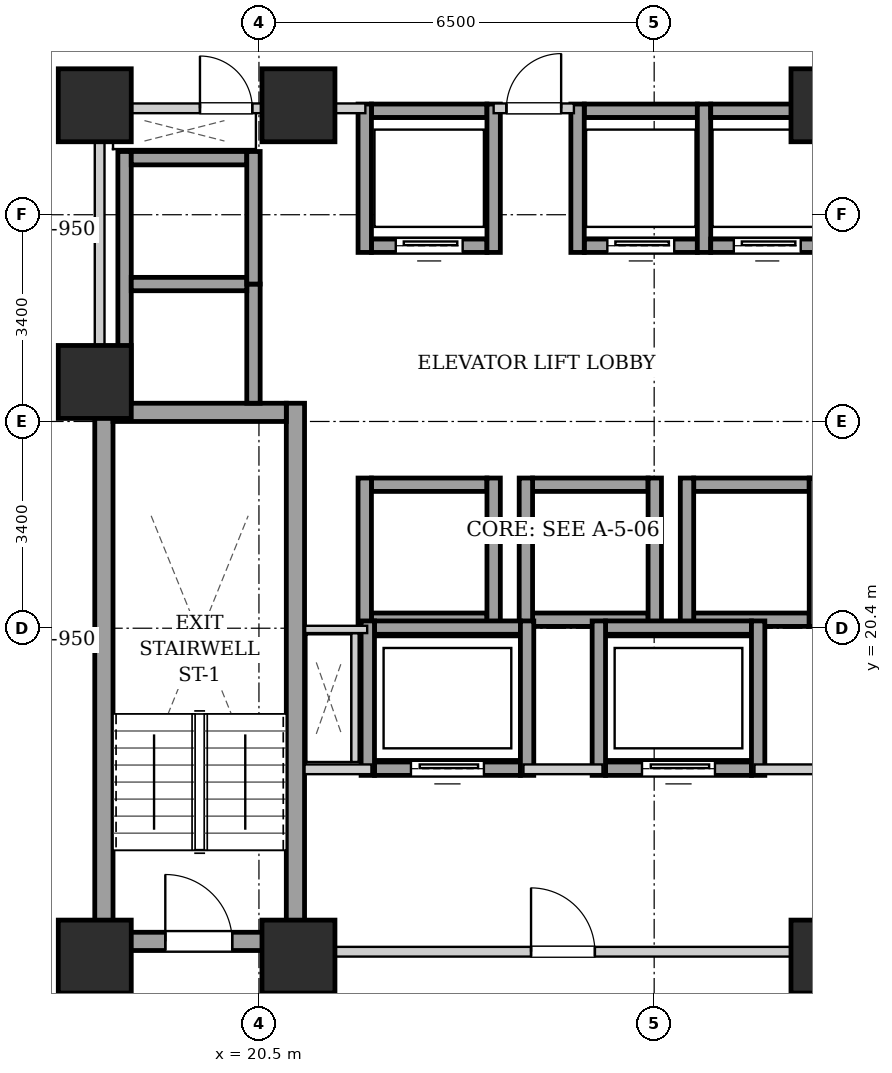
"""IFC4 building model, lengths in metres.
Left out: names, types, materials, properties, quantities, classifications, styles, units other than length and angle.
Written with IfcOpenShell. Run it as: python <this file> out.ifc"""

import sys

from ifc_helpers import new_model, si_unit, direction, frame, frame_2d, origin, origin_2d, place, context, subcontext, project, spatial, rectangle, extrude, element, fill, save


model = new_model("IFC4")
c1 = context("Model", 3, precision=1e-05, world=origin(), true_north=direction((0.0, 1.0)))
c2 = subcontext(c1, "Body", "Model", "MODEL_VIEW")
j1 = project(units=[si_unit("LENGTHUNIT", "METRE"), si_unit("PLANEANGLEUNIT", "RADIAN")], contexts=[c1])
p1 = place(None, origin())
s1 = spatial("IfcSite", under=j1, at=p1, CompositionType="ELEMENT")
p2 = place(p1, origin())
s2 = spatial("IfcBuilding", under=s1, at=p2, CompositionType="ELEMENT")
p3 = place(p2, frame((0.0, 0.0, 32.2)))
s3 = spatial("IfcBuildingStorey", under=s2, at=p3, CompositionType="ELEMENT", Elevation=32.2)
for number, where, z_axis, x_axis in (
    (1, (17.8, 15.0, 0.0), (0.0, 0.0, 1.0), (1.0, 0.0, 0.0)),
    (2, (21.15, 15.0, 0.0), (0.0, 0.0, 1.0), (1.0, 0.0, 0.0)),
    (3, (29.85, 15.0, 0.0), (0.0, 0.0, 1.0), (1.0, 0.0, 0.0)),
    (4, (17.8, 29.0, 0.0), (0.0, 0.0, 1.0), (1.0, 0.0, 0.0)),
    (5, (21.15, 29.0, 0.0), (0.0, 0.0, 1.0), (1.0, 0.0, 0.0)),
    (6, (29.85, 29.0, 0.0), (0.0, 0.0, 1.0), (1.0, 0.0, 0.0)),
    (7, (17.8, 24.45, 0.0), (0.0, 0.0, 1.0), (1.0, 0.0, 0.0)),
):
    element("IfcColumn", number, at=place(p3, frame(where, z_axis=z_axis, x_axis=x_axis)), inside=s3, PredefinedType="COLUMN", context=c2, shape_type="SweptSolid", body=[
        extrude(rectangle(XDim=1.2, YDim=1.2, at=origin_2d()), origin(), (0.0, 0.0, 1.0), 3.2),
    ])
for number, where, z_axis, x_axis in (
    (8, (17.95, 15.1, 0.0), (0.0, 0.0, 1.0), (0.0, 1.0, 0.0)),
    (9, (21.1, 15.1, 0.0), (0.0, 0.0, 1.0), (0.0, 1.0, 0.0)),
):
    element("IfcWall", number, at=place(p3, frame(where, z_axis=z_axis, x_axis=x_axis)), inside=s3, PredefinedType="SHEAR", context=c2, shape_type="SweptSolid", body=[
        extrude(rectangle(XDim=9.0, YDim=0.3, at=frame_2d((4.5, 0.0))), origin(), (0.0, 0.0, 1.0), 2.94),
    ])
p4 = place(p3, frame((18.1, 23.95, 0.0), z_axis=(0.0, 0.0, 1.0), x_axis=(1.0, 0.0, 0.0)))
e10 = element("IfcWall", 10, at=p4, inside=s3, PredefinedType="SHEAR", context=c2, shape_type="SweptSolid", body=[
    extrude(rectangle(XDim=2.85, YDim=0.3, at=frame_2d((1.425, 0.0))), origin(), (0.0, 0.0, 1.0), 2.94),
])
p5 = place(p3, frame((18.1, 15.25, 0.0), z_axis=(0.0, 0.0, 1.0), x_axis=(1.0, 0.0, 0.0)))
e11 = element("IfcWall", 11, at=p5, inside=s3, PredefinedType="SHEAR", context=c2, shape_type="SweptSolid", body=[
    extrude(rectangle(XDim=2.85, YDim=0.3, at=frame_2d((1.425, 0.0))), origin(), (0.0, 0.0, 1.0), 2.94),
])
p6 = place(p5, frame((0.86, 0.0, 0.0)))
e12 = element("IfcOpeningElement", 12, at=p6, cuts=e11, PredefinedType="OPENING", context=c2, shape_type="SweptSolid", body=[
    extrude(rectangle(XDim=1.1, YDim=2.05, at=frame_2d((0.55, 1.025))), frame((0.0, 0.16, 0.0), z_axis=(0.0, -1.0, 0.0), x_axis=(1.0, 0.0, 0.0)), (0.0, 0.0, 1.0), 0.32),
])
p7 = place(p3, frame((22.35, 26.69, 0.0), z_axis=(0.0, 0.0, 1.0), x_axis=(1.0, 0.0, 0.0)))
e13 = element("IfcWall", 13, at=p7, inside=s3, PredefinedType="SHEAR", context=c2, shape_type="SweptSolid", body=[
    extrude(rectangle(XDim=1.9, YDim=0.22, at=frame_2d((0.95, 0.0))), origin(), (0.0, 0.0, 1.0), 2.94),
])
p8 = place(p7, frame((0.4, 0.0, 0.0)))
e14 = element("IfcOpeningElement", 14, at=p8, cuts=e13, PredefinedType="OPENING", context=c2, shape_type="SweptSolid", body=[
    extrude(rectangle(XDim=1.1, YDim=2.15, at=frame_2d((0.55, 1.075))), frame((0.0, 0.12, 0.0), z_axis=(0.0, -1.0, 0.0), x_axis=(1.0, 0.0, 0.0)), (0.0, 0.0, 1.0), 0.24),
])
p9 = place(p3, frame((22.35, 28.91, 0.0), z_axis=(0.0, 0.0, 1.0), x_axis=(1.0, 0.0, 0.0)))
e15 = element("IfcWall", 15, at=p9, inside=s3, PredefinedType="SHEAR", context=c2, shape_type="SweptSolid", body=[
    extrude(rectangle(XDim=1.9, YDim=0.22, at=frame_2d((0.95, 0.0))), origin(), (0.0, 0.0, 1.0), 2.94),
])
for number, where, z_axis, x_axis in (
    (16, (22.24, 26.58, 0.0), (0.0, 0.0, 1.0), (0.0, 1.0, 0.0)),
    (17, (24.36, 26.58, 0.0), (0.0, 0.0, 1.0), (0.0, 1.0, 0.0)),
):
    element("IfcWall", number, at=place(p3, frame(where, z_axis=z_axis, x_axis=x_axis)), inside=s3, PredefinedType="SHEAR", context=c2, shape_type="SweptSolid", body=[
        extrude(rectangle(XDim=2.44, YDim=0.22, at=frame_2d((1.22, 0.0))), origin(), (0.0, 0.0, 1.0), 2.94),
    ])
p10 = place(p3, frame((25.85, 26.69, 0.0), z_axis=(0.0, 0.0, 1.0), x_axis=(1.0, 0.0, 0.0)))
e18 = element("IfcWall", 18, at=p10, inside=s3, PredefinedType="SHEAR", context=c2, shape_type="SweptSolid", body=[
    extrude(rectangle(XDim=1.86, YDim=0.22, at=frame_2d((0.93, 0.0))), origin(), (0.0, 0.0, 1.0), 2.94),
])
p11 = place(p10, frame((0.38, 0.0, 0.0)))
e19 = element("IfcOpeningElement", 19, at=p11, cuts=e18, PredefinedType="OPENING", context=c2, shape_type="SweptSolid", body=[
    extrude(rectangle(XDim=1.1, YDim=2.15, at=frame_2d((0.55, 1.075))), frame((0.0, 0.12, 0.0), z_axis=(0.0, -1.0, 0.0), x_axis=(1.0, 0.0, 0.0)), (0.0, 0.0, 1.0), 0.24),
])
p12 = place(p3, frame((25.85, 28.91, 0.0), z_axis=(0.0, 0.0, 1.0), x_axis=(1.0, 0.0, 0.0)))
e20 = element("IfcWall", 20, at=p12, inside=s3, PredefinedType="SHEAR", context=c2, shape_type="SweptSolid", body=[
    extrude(rectangle(XDim=1.86, YDim=0.22, at=frame_2d((0.93, 0.0))), origin(), (0.0, 0.0, 1.0), 2.94),
])
for number, where, z_axis, x_axis in (
    (21, (25.74, 26.58, 0.0), (0.0, 0.0, 1.0), (0.0, 1.0, 0.0)),
    (22, (27.82, 26.58, 0.0), (0.0, 0.0, 1.0), (0.0, 1.0, 0.0)),
):
    element("IfcWall", number, at=place(p3, frame(where, z_axis=z_axis, x_axis=x_axis)), inside=s3, PredefinedType="SHEAR", context=c2, shape_type="SweptSolid", body=[
        extrude(rectangle(XDim=2.44, YDim=0.22, at=frame_2d((1.22, 0.0))), origin(), (0.0, 0.0, 1.0), 2.94),
    ])
p13 = place(p3, frame((27.93, 26.69, 0.0), z_axis=(0.0, 0.0, 1.0), x_axis=(1.0, 0.0, 0.0)))
e23 = element("IfcWall", 23, at=p13, inside=s3, PredefinedType="SHEAR", context=c2, shape_type="SweptSolid", body=[
    extrude(rectangle(XDim=1.86, YDim=0.22, at=frame_2d((0.93, 0.0))), origin(), (0.0, 0.0, 1.0), 2.94),
])
p14 = place(p13, frame((0.38, 0.0, 0.0)))
e24 = element("IfcOpeningElement", 24, at=p14, cuts=e23, PredefinedType="OPENING", context=c2, shape_type="SweptSolid", body=[
    extrude(rectangle(XDim=1.1, YDim=2.15, at=frame_2d((0.55, 1.075))), frame((0.0, 0.12, 0.0), z_axis=(0.0, -1.0, 0.0), x_axis=(1.0, 0.0, 0.0)), (0.0, 0.0, 1.0), 0.24),
])
p15 = place(p3, frame((27.93, 28.91, 0.0), z_axis=(0.0, 0.0, 1.0), x_axis=(1.0, 0.0, 0.0)))
e25 = element("IfcWall", 25, at=p15, inside=s3, PredefinedType="SHEAR", context=c2, shape_type="SweptSolid", body=[
    extrude(rectangle(XDim=1.86, YDim=0.22, at=frame_2d((0.93, 0.0))), origin(), (0.0, 0.0, 1.0), 2.94),
])
for number, where, z_axis, x_axis in (
    (26, (22.35, 20.54, 0.0), (0.0, 0.0, 1.0), (1.0, 0.0, 0.0)),
    (27, (22.35, 22.76, 0.0), (0.0, 0.0, 1.0), (1.0, 0.0, 0.0)),
):
    element("IfcWall", number, at=place(p3, frame(where, z_axis=z_axis, x_axis=x_axis)), inside=s3, PredefinedType="SHEAR", context=c2, shape_type="SweptSolid", body=[
        extrude(rectangle(XDim=1.9, YDim=0.22, at=frame_2d((0.95, 0.0))), origin(), (0.0, 0.0, 1.0), 2.94),
    ])
for number, where, z_axis, x_axis in (
    (28, (22.24, 20.43, 0.0), (0.0, 0.0, 1.0), (0.0, 1.0, 0.0)),
    (29, (24.36, 20.43, 0.0), (0.0, 0.0, 1.0), (0.0, 1.0, 0.0)),
):
    element("IfcWall", number, at=place(p3, frame(where, z_axis=z_axis, x_axis=x_axis)), inside=s3, PredefinedType="SHEAR", context=c2, shape_type="SweptSolid", body=[
        extrude(rectangle(XDim=2.44, YDim=0.22, at=frame_2d((1.22, 0.0))), origin(), (0.0, 0.0, 1.0), 2.94),
    ])
for number, where, z_axis, x_axis in (
    (30, (25.0, 20.54, 0.0), (0.0, 0.0, 1.0), (1.0, 0.0, 0.0)),
    (31, (25.0, 22.76, 0.0), (0.0, 0.0, 1.0), (1.0, 0.0, 0.0)),
):
    element("IfcWall", number, at=place(p3, frame(where, z_axis=z_axis, x_axis=x_axis)), inside=s3, PredefinedType="SHEAR", context=c2, shape_type="SweptSolid", body=[
        extrude(rectangle(XDim=1.9, YDim=0.22, at=frame_2d((0.95, 0.0))), origin(), (0.0, 0.0, 1.0), 2.94),
    ])
for number, where, z_axis, x_axis in (
    (32, (24.89, 20.43, 0.0), (0.0, 0.0, 1.0), (0.0, 1.0, 0.0)),
    (33, (27.01, 20.43, 0.0), (0.0, 0.0, 1.0), (0.0, 1.0, 0.0)),
):
    element("IfcWall", number, at=place(p3, frame(where, z_axis=z_axis, x_axis=x_axis)), inside=s3, PredefinedType="SHEAR", context=c2, shape_type="SweptSolid", body=[
        extrude(rectangle(XDim=2.44, YDim=0.22, at=frame_2d((1.22, 0.0))), origin(), (0.0, 0.0, 1.0), 2.94),
    ])
for number, where, z_axis, x_axis in (
    (34, (27.65, 20.54, 0.0), (0.0, 0.0, 1.0), (1.0, 0.0, 0.0)),
    (35, (27.65, 22.76, 0.0), (0.0, 0.0, 1.0), (1.0, 0.0, 0.0)),
):
    element("IfcWall", number, at=place(p3, frame(where, z_axis=z_axis, x_axis=x_axis)), inside=s3, PredefinedType="SHEAR", context=c2, shape_type="SweptSolid", body=[
        extrude(rectangle(XDim=1.9, YDim=0.22, at=frame_2d((0.95, 0.0))), origin(), (0.0, 0.0, 1.0), 2.94),
    ])
for number, where, z_axis, x_axis in (
    (36, (27.54, 20.43, 0.0), (0.0, 0.0, 1.0), (0.0, 1.0, 0.0)),
    (37, (29.66, 20.43, 0.0), (0.0, 0.0, 1.0), (0.0, 1.0, 0.0)),
):
    element("IfcWall", number, at=place(p3, frame(where, z_axis=z_axis, x_axis=x_axis)), inside=s3, PredefinedType="SHEAR", context=c2, shape_type="SweptSolid", body=[
        extrude(rectangle(XDim=2.44, YDim=0.22, at=frame_2d((1.22, 0.0))), origin(), (0.0, 0.0, 1.0), 2.94),
    ])
p16 = place(p3, frame((18.29, 24.1, 0.0), z_axis=(0.0, 0.0, 1.0), x_axis=(0.0, 1.0, 0.0)))
e38 = element("IfcWall", 38, at=p16, inside=s3, PredefinedType="SHEAR", context=c2, shape_type="SweptSolid", body=[
    extrude(rectangle(XDim=4.14, YDim=0.22, at=frame_2d((2.07, 0.0))), origin(), (0.0, 0.0, 1.0), 2.94),
])
p17 = place(p3, frame((20.41, 24.1, 0.0), z_axis=(0.0, 0.0, 1.0), x_axis=(0.0, 1.0, 0.0)))
e39 = element("IfcWall", 39, at=p17, inside=s3, PredefinedType="SHEAR", context=c2, shape_type="SweptSolid", body=[
    extrude(rectangle(XDim=1.96, YDim=0.22, at=frame_2d((0.98, 0.0))), origin(), (0.0, 0.0, 1.0), 2.94),
])
for number, where, z_axis, x_axis in (
    (40, (18.4, 26.06, 0.0), (0.0, 0.0, 1.0), (1.0, 0.0, 0.0)),
    (41, (18.4, 28.13, 0.0), (0.0, 0.0, 1.0), (1.0, 0.0, 0.0)),
):
    element("IfcWall", number, at=place(p3, frame(where, z_axis=z_axis, x_axis=x_axis)), inside=s3, PredefinedType="SHEAR", context=c2, shape_type="SweptSolid", body=[
        extrude(rectangle(XDim=1.9, YDim=0.22, at=frame_2d((0.95, 0.0))), origin(), (0.0, 0.0, 1.0), 2.94),
    ])
p18 = place(p3, frame((20.41, 26.06, 0.0), z_axis=(0.0, 0.0, 1.0), x_axis=(0.0, 1.0, 0.0)))
e42 = element("IfcWall", 42, at=p18, inside=s3, PredefinedType="SHEAR", context=c2, shape_type="SweptSolid", body=[
    extrude(rectangle(XDim=2.18, YDim=0.22, at=frame_2d((1.09, 0.0))), origin(), (0.0, 0.0, 1.0), 2.94),
])
p19 = place(p3, frame((22.4, 18.09, 0.0), z_axis=(0.0, 0.0, 1.0), x_axis=(1.0, 0.0, 0.0)))
e43 = element("IfcWall", 43, at=p19, inside=s3, PredefinedType="SHEAR", context=c2, shape_type="SweptSolid", body=[
    extrude(rectangle(XDim=2.4, YDim=0.22, at=frame_2d((1.2, 0.0))), origin(), (0.0, 0.0, 1.0), 2.94),
])
p20 = place(p19, frame((0.6, 0.0, 0.0)))
e44 = element("IfcOpeningElement", 44, at=p20, cuts=e43, PredefinedType="OPENING", context=c2, shape_type="SweptSolid", body=[
    extrude(rectangle(XDim=1.2, YDim=2.15, at=frame_2d((0.6, 1.075))), frame((0.0, 0.12, 0.0), z_axis=(0.0, -1.0, 0.0), x_axis=(1.0, 0.0, 0.0)), (0.0, 0.0, 1.0), 0.24),
])
p21 = place(p3, frame((22.4, 20.41, 0.0), z_axis=(0.0, 0.0, 1.0), x_axis=(1.0, 0.0, 0.0)))
e45 = element("IfcWall", 45, at=p21, inside=s3, PredefinedType="SHEAR", context=c2, shape_type="SweptSolid", body=[
    extrude(rectangle(XDim=2.4, YDim=0.22, at=frame_2d((1.2, 0.0))), origin(), (0.0, 0.0, 1.0), 2.94),
])
for number, where, z_axis, x_axis in (
    (46, (22.29, 17.98, 0.0), (0.0, 0.0, 1.0), (0.0, 1.0, 0.0)),
    (47, (24.91, 17.98, 0.0), (0.0, 0.0, 1.0), (0.0, 1.0, 0.0)),
):
    element("IfcWall", number, at=place(p3, frame(where, z_axis=z_axis, x_axis=x_axis)), inside=s3, PredefinedType="SHEAR", context=c2, shape_type="SweptSolid", body=[
        extrude(rectangle(XDim=2.54, YDim=0.22, at=frame_2d((1.27, 0.0))), origin(), (0.0, 0.0, 1.0), 2.94),
    ])
p22 = place(p3, frame((26.2, 18.09, 0.0), z_axis=(0.0, 0.0, 1.0), x_axis=(1.0, 0.0, 0.0)))
e48 = element("IfcWall", 48, at=p22, inside=s3, PredefinedType="SHEAR", context=c2, shape_type="SweptSolid", body=[
    extrude(rectangle(XDim=2.4, YDim=0.22, at=frame_2d((1.2, 0.0))), origin(), (0.0, 0.0, 1.0), 2.94),
])
p23 = place(p22, frame((0.6, 0.0, 0.0)))
e49 = element("IfcOpeningElement", 49, at=p23, cuts=e48, PredefinedType="OPENING", context=c2, shape_type="SweptSolid", body=[
    extrude(rectangle(XDim=1.2, YDim=2.15, at=frame_2d((0.6, 1.075))), frame((0.0, 0.12, 0.0), z_axis=(0.0, -1.0, 0.0), x_axis=(1.0, 0.0, 0.0)), (0.0, 0.0, 1.0), 0.24),
])
p24 = place(p3, frame((26.2, 20.41, 0.0), z_axis=(0.0, 0.0, 1.0), x_axis=(1.0, 0.0, 0.0)))
e50 = element("IfcWall", 50, at=p24, inside=s3, PredefinedType="SHEAR", context=c2, shape_type="SweptSolid", body=[
    extrude(rectangle(XDim=2.4, YDim=0.22, at=frame_2d((1.2, 0.0))), origin(), (0.0, 0.0, 1.0), 2.94),
])
for number, where, z_axis, x_axis in (
    (51, (26.09, 17.98, 0.0), (0.0, 0.0, 1.0), (0.0, 1.0, 0.0)),
    (52, (28.71, 17.98, 0.0), (0.0, 0.0, 1.0), (0.0, 1.0, 0.0)),
):
    element("IfcWall", number, at=place(p3, frame(where, z_axis=z_axis, x_axis=x_axis)), inside=s3, PredefinedType="SHEAR", context=c2, shape_type="SweptSolid", body=[
        extrude(rectangle(XDim=2.54, YDim=0.22, at=frame_2d((1.27, 0.0))), origin(), (0.0, 0.0, 1.0), 2.94),
    ])
p25 = place(p3, frame((21.25, 15.08, 0.0), z_axis=(0.0, 0.0, 1.0), x_axis=(1.0, 0.0, 0.0)))
e53 = element("IfcWall", 53, at=p25, inside=s3, PredefinedType="PARTITIONING", context=c2, shape_type="SweptSolid", body=[
    extrude(rectangle(XDim=8.5, YDim=0.16, at=frame_2d((4.25, 0.0))), origin(), (0.0, 0.0, 1.0), 2.155),
])
p26 = place(p25, frame((3.725, 0.0, 0.0)))
e54 = element("IfcOpeningElement", 54, at=p26, cuts=e53, PredefinedType="OPENING", context=c2, shape_type="SweptSolid", body=[
    extrude(rectangle(XDim=1.05, YDim=2.05, at=frame_2d((0.525, 1.025))), frame((0.0, 0.09, 0.0), z_axis=(0.0, -1.0, 0.0), x_axis=(1.0, 0.0, 0.0)), (0.0, 0.0, 1.0), 0.18),
])
p27 = place(p3, frame((21.25, 18.08, 0.0), z_axis=(0.0, 0.0, 1.0), x_axis=(1.0, 0.0, 0.0)))
e55 = element("IfcWall", 55, at=p27, inside=s3, PredefinedType="PARTITIONING", context=c2, shape_type="SweptSolid", body=[
    extrude(rectangle(XDim=1.1, YDim=0.16, at=frame_2d((0.55, 0.0))), origin(), (0.0, 0.0, 1.0), 2.94),
])
p28 = place(p3, frame((24.85, 18.08, 0.0), z_axis=(0.0, 0.0, 1.0), x_axis=(1.0, 0.0, 0.0)))
e56 = element("IfcWall", 56, at=p28, inside=s3, PredefinedType="PARTITIONING", context=c2, shape_type="SweptSolid", body=[
    extrude(rectangle(XDim=1.3, YDim=0.16, at=frame_2d((0.65, 0.0))), origin(), (0.0, 0.0, 1.0), 2.94),
])
p29 = place(p3, frame((28.65, 18.08, 0.0), z_axis=(0.0, 0.0, 1.0), x_axis=(1.0, 0.0, 0.0)))
e57 = element("IfcWall", 57, at=p29, inside=s3, PredefinedType="PARTITIONING", context=c2, shape_type="SweptSolid", body=[
    extrude(rectangle(XDim=1.1, YDim=0.16, at=frame_2d((0.55, 0.0))), origin(), (0.0, 0.0, 1.0), 2.94),
])
p30 = place(p3, frame((17.88, 24.12, 0.0), z_axis=(0.0, 0.0, 1.0), x_axis=(0.0, 1.0, 0.0)))
e58 = element("IfcWall", 58, at=p30, inside=s3, PredefinedType="PARTITIONING", context=c2, shape_type="SweptSolid", body=[
    extrude(rectangle(XDim=4.76, YDim=0.16, at=frame_2d((2.38, 0.0))), origin(), (0.0, 0.0, 1.0), 2.94),
])
p31 = place(p3, frame((24.36, 28.95, 0.0), z_axis=(0.0, 0.0, 1.0), x_axis=(1.0, 0.0, 0.0)))
e59 = element("IfcWall", 59, at=p31, inside=s3, PredefinedType="PARTITIONING", context=c2, shape_type="SweptSolid", body=[
    extrude(rectangle(XDim=1.32, YDim=0.16, at=frame_2d((0.66, 0.0))), origin(), (0.0, 0.0, 1.0), 2.155),
])
p32 = place(p31, frame((0.21, 0.0, 0.0)))
e60 = element("IfcOpeningElement", 60, at=p32, cuts=e59, PredefinedType="OPENING", context=c2, shape_type="SweptSolid", body=[
    extrude(rectangle(XDim=0.9, YDim=2.05, at=frame_2d((0.45, 1.025))), frame((0.0, 0.09, 0.0), z_axis=(0.0, -1.0, 0.0), x_axis=(1.0, 0.0, 0.0)), (0.0, 0.0, 1.0), 0.18),
])
p33 = place(p3, frame((17.96, 28.95, 0.0), z_axis=(0.0, 0.0, 1.0), x_axis=(1.0, 0.0, 0.0)))
e61 = element("IfcWall", 61, at=p33, inside=s3, PredefinedType="PARTITIONING", context=c2, shape_type="SweptSolid", body=[
    extrude(rectangle(XDim=4.29, YDim=0.16, at=frame_2d((2.145, 0.0))), origin(), (0.0, 0.0, 1.0), 2.155),
])
p34 = place(p33, frame((1.57, 0.0, 0.0)))
e62 = element("IfcOpeningElement", 62, at=p34, cuts=e61, PredefinedType="OPENING", context=c2, shape_type="SweptSolid", body=[
    extrude(rectangle(XDim=0.86, YDim=2.05, at=frame_2d((0.43, 1.025))), frame((0.0, 0.09, 0.0), z_axis=(0.0, -1.0, 0.0), x_axis=(1.0, 0.0, 0.0)), (0.0, 0.0, 1.0), 0.18),
])
p35 = place(p3, frame((22.08, 18.2, 0.0), z_axis=(0.0, 0.0, 1.0), x_axis=(0.0, 1.0, 0.0)))
e63 = element("IfcWall", 63, at=p35, inside=s3, PredefinedType="PARTITIONING", context=c2, shape_type="SweptSolid", body=[
    extrude(rectangle(XDim=2.12, YDim=0.12, at=frame_2d((1.06, 0.0))), origin(), (0.0, 0.0, 1.0), 2.94),
])
p36 = place(p3, frame((22.28, 20.38, 0.0), z_axis=(0.0, 0.0, 1.0), x_axis=(-1.0, 0.0, 0.0)))
e64 = element("IfcWall", 64, at=p36, inside=s3, PredefinedType="PARTITIONING", context=c2, shape_type="SweptSolid", body=[
    extrude(rectangle(XDim=1.02, YDim=0.12, at=frame_2d((0.51, 0.0))), origin(), (0.0, 0.0, 1.0), 2.94),
])
p37 = place(p6, origin())
e65 = element("IfcDoor", 65, at=p37, inside=s3, OperationType="SINGLE_SWING_LEFT", PredefinedType="DOOR", context=c2, shape_type="SweptSolid", body=[
    extrude(rectangle(XDim=1.1, YDim=2.05, at=frame_2d((0.55, 1.025))), frame((0.0, 0.025, 0.0), z_axis=(0.0, -1.0, 0.0), x_axis=(1.0, 0.0, 0.0)), (0.0, 0.0, 1.0), 0.05),
])
fill(e12, e65)
p38 = place(p8, origin())
e66 = element("IfcDoor", 66, at=p38, inside=s3, OperationType="SLIDING_TO_LEFT", PredefinedType="DOOR", context=c2, shape_type="SweptSolid", body=[
    extrude(rectangle(XDim=1.1, YDim=2.15, at=frame_2d((0.55, 1.075))), frame((0.0, 0.025, 0.0), z_axis=(0.0, -1.0, 0.0), x_axis=(1.0, 0.0, 0.0)), (0.0, 0.0, 1.0), 0.05),
])
fill(e14, e66)
p39 = place(p11, origin())
e67 = element("IfcDoor", 67, at=p39, inside=s3, OperationType="SLIDING_TO_LEFT", PredefinedType="DOOR", context=c2, shape_type="SweptSolid", body=[
    extrude(rectangle(XDim=1.1, YDim=2.15, at=frame_2d((0.55, 1.075))), frame((0.0, 0.025, 0.0), z_axis=(0.0, -1.0, 0.0), x_axis=(1.0, 0.0, 0.0)), (0.0, 0.0, 1.0), 0.05),
])
fill(e19, e67)
p40 = place(p14, origin())
e68 = element("IfcDoor", 68, at=p40, inside=s3, OperationType="SLIDING_TO_LEFT", PredefinedType="DOOR", context=c2, shape_type="SweptSolid", body=[
    extrude(rectangle(XDim=1.1, YDim=2.15, at=frame_2d((0.55, 1.075))), frame((0.0, 0.025, 0.0), z_axis=(0.0, -1.0, 0.0), x_axis=(1.0, 0.0, 0.0)), (0.0, 0.0, 1.0), 0.05),
])
fill(e24, e68)
p41 = place(p20, origin())
e69 = element("IfcDoor", 69, at=p41, inside=s3, OperationType="SLIDING_TO_LEFT", PredefinedType="DOOR", context=c2, shape_type="SweptSolid", body=[
    extrude(rectangle(XDim=1.2, YDim=2.15, at=frame_2d((0.6, 1.075))), frame((0.0, 0.025, 0.0), z_axis=(0.0, -1.0, 0.0), x_axis=(1.0, 0.0, 0.0)), (0.0, 0.0, 1.0), 0.05),
])
fill(e44, e69)
p42 = place(p23, origin())
e70 = element("IfcDoor", 70, at=p42, inside=s3, OperationType="SLIDING_TO_LEFT", PredefinedType="DOOR", context=c2, shape_type="SweptSolid", body=[
    extrude(rectangle(XDim=1.2, YDim=2.15, at=frame_2d((0.6, 1.075))), frame((0.0, 0.025, 0.0), z_axis=(0.0, -1.0, 0.0), x_axis=(1.0, 0.0, 0.0)), (0.0, 0.0, 1.0), 0.05),
])
fill(e49, e70)
p43 = place(p26, origin())
e71 = element("IfcDoor", 71, at=p43, inside=s3, OperationType="SINGLE_SWING_LEFT", PredefinedType="DOOR", context=c2, shape_type="SweptSolid", body=[
    extrude(rectangle(XDim=1.05, YDim=2.05, at=frame_2d((0.525, 1.025))), frame((0.0, 0.025, 0.0), z_axis=(0.0, -1.0, 0.0), x_axis=(1.0, 0.0, 0.0)), (0.0, 0.0, 1.0), 0.05),
])
fill(e54, e71)
p44 = place(p32, origin())
e72 = element("IfcDoor", 72, at=p44, inside=s3, OperationType="SINGLE_SWING_RIGHT", PredefinedType="DOOR", context=c2, shape_type="SweptSolid", body=[
    extrude(rectangle(XDim=0.9, YDim=2.05, at=frame_2d((0.45, 1.025))), frame((0.0, 0.025, 0.0), z_axis=(0.0, -1.0, 0.0), x_axis=(1.0, 0.0, 0.0)), (0.0, 0.0, 1.0), 0.05),
])
fill(e60, e72)
p45 = place(p34, origin())
e73 = element("IfcDoor", 73, at=p45, inside=s3, OperationType="SINGLE_SWING_LEFT", PredefinedType="DOOR", context=c2, shape_type="SweptSolid", body=[
    extrude(rectangle(XDim=0.86, YDim=2.05, at=frame_2d((0.43, 1.025))), frame((0.0, 0.025, 0.0), z_axis=(0.0, -1.0, 0.0), x_axis=(1.0, 0.0, 0.0)), (0.0, 0.0, 1.0), 0.05),
])
fill(e62, e73)
save(model, sys.argv[1])
